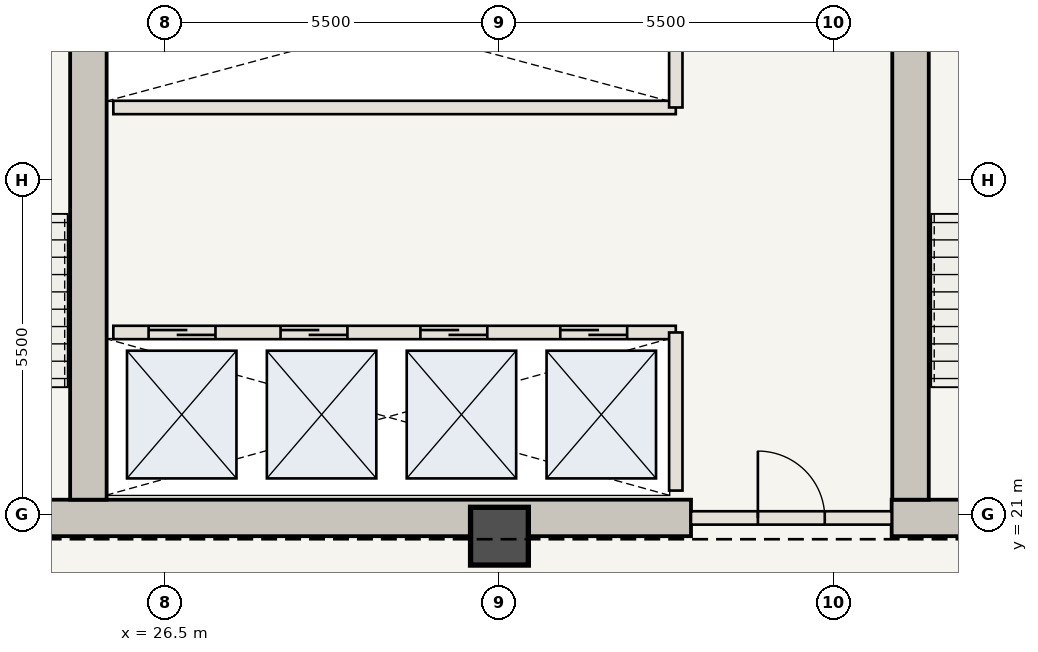
"""IFC4 building model, lengths in metres.
Left out: names, types, materials, properties, quantities, classifications, styles, units other than length and angle.
Written with IfcOpenShell. Run it as: python <this file> out.ifc"""

import sys

from ifc_helpers import new_model, si_unit, direction, frame, frame_2d, origin, origin_2d, place, context, subcontext, project, spatial, rectangle, extrude, element, fill, save


model = new_model("IFC4")
c1 = context("Model", 3, precision=1e-05, world=origin(), true_north=direction((0.0, 1.0)))
c2 = subcontext(c1, "Body", "Model", "MODEL_VIEW")
j1 = project(units=[si_unit("LENGTHUNIT", "METRE"), si_unit("PLANEANGLEUNIT", "RADIAN")], contexts=[c1])
p1 = place(None, origin())
s1 = spatial("IfcSite", under=j1, at=p1, CompositionType="ELEMENT")
p2 = place(p1, origin())
s2 = spatial("IfcBuilding", under=s1, at=p2, CompositionType="ELEMENT")
p3 = place(p2, frame((0.0, 0.0, 156.8)))
s3 = spatial("IfcBuildingStorey", under=s2, at=p3, CompositionType="ELEMENT", Elevation=156.8)
p4 = place(p3, frame((21.41, 20.95, 0.0), z_axis=(0.0, 0.0, 1.0), x_axis=(1.0, 0.0, 0.0)))
e1 = element("IfcWall", 1, at=p4, inside=s3, PredefinedType="SHEAR", context=c2, shape_type="SweptSolid", body=[
    extrude(rectangle(XDim=13.74, YDim=0.6, at=frame_2d((6.87, 0.0))), origin(), (0.0, 0.0, 1.0), 3.85),
])
p5 = place(p3, frame((38.45, 20.95, 0.0), z_axis=(0.0, 0.0, 1.0), x_axis=(1.0, 0.0, 0.0)))
e2 = element("IfcWall", 2, at=p5, inside=s3, PredefinedType="SHEAR", context=c2, shape_type="SweptSolid", body=[
    extrude(rectangle(XDim=4.14, YDim=0.6, at=frame_2d((2.07, 0.0))), origin(), (0.0, 0.0, 1.0), 3.85),
])
for number, where, z_axis, x_axis in (
    (3, (25.24, 21.25, 0.0), (0.0, 0.0, 1.0), (0.0, 1.0, 0.0)),
    (4, (38.76, 21.25, 0.0), (0.0, 0.0, 1.0), (0.0, 1.0, 0.0)),
):
    element("IfcWall", number, at=place(p3, frame(where, z_axis=z_axis, x_axis=x_axis)), inside=s3, PredefinedType="SHEAR", context=c2, shape_type="SweptSolid", body=[
        extrude(rectangle(XDim=9.35, YDim=0.6, at=frame_2d((4.675, 0.0))), origin(), (0.0, 0.0, 1.0), 3.85),
    ])
p6 = place(p3, frame((32.0, 20.65, 0.0), z_axis=(0.0, 0.0, 1.0), x_axis=(1.0, 0.0, 0.0)))
e5 = element("IfcColumn", 5, at=p6, inside=s3, PredefinedType="COLUMN", context=c2, shape_type="SweptSolid", body=[
    extrude(rectangle(XDim=0.95, YDim=0.95, at=origin_2d()), origin(), (0.0, 0.0, 1.0), 3.85),
])
p7 = place(p3, frame((35.15, 20.95, 0.0), z_axis=(0.0, 0.0, 1.0), x_axis=(1.0, 0.0, 0.0)))
e6 = element("IfcWall", 6, at=p7, inside=s3, PredefinedType="STANDARD", context=c2, shape_type="SweptSolid", body=[
    extrude(rectangle(XDim=3.3, YDim=0.22, at=frame_2d((1.65, 0.0))), origin(), (0.0, 0.0, 1.0), 3.685),
])
p8 = place(p7, frame((1.1, 0.0, 0.0)))
e7 = element("IfcOpeningElement", 7, at=p8, cuts=e6, PredefinedType="OPENING", context=c2, shape_type="SweptSolid", body=[
    extrude(rectangle(XDim=1.1, YDim=2.15, at=frame_2d((0.55, 1.075))), frame((0.0, 0.12, 0.0), z_axis=(0.0, -1.0, 0.0), x_axis=(1.0, 0.0, 0.0)), (0.0, 0.0, 1.0), 0.24),
])
p9 = place(p3, frame((25.65, 24.0, 0.0), z_axis=(0.0, 0.0, 1.0), x_axis=(1.0, 0.0, 0.0)))
e8 = element("IfcWall", 8, at=p9, inside=s3, PredefinedType="STANDARD", context=c2, shape_type="SweptSolid", body=[
    extrude(rectangle(XDim=9.25, YDim=0.22, at=frame_2d((4.625, 0.0))), origin(), (0.0, 0.0, 1.0), 3.685),
])
p10 = place(p9, frame((0.58, 0.0, 0.0)))
e9 = element("IfcOpeningElement", 9, at=p10, cuts=e8, PredefinedType="OPENING", context=c2, shape_type="SweptSolid", body=[
    extrude(rectangle(XDim=1.1, YDim=2.15, at=frame_2d((0.55, 1.075))), frame((0.0, 0.12, 0.0), z_axis=(0.0, -1.0, 0.0), x_axis=(1.0, 0.0, 0.0)), (0.0, 0.0, 1.0), 0.24),
])
p11 = place(p9, frame((2.75, 0.0, 0.0)))
e10 = element("IfcOpeningElement", 10, at=p11, cuts=e8, PredefinedType="OPENING", context=c2, shape_type="SweptSolid", body=[
    extrude(rectangle(XDim=1.1, YDim=2.15, at=frame_2d((0.55, 1.075))), frame((0.0, 0.12, 0.0), z_axis=(0.0, -1.0, 0.0), x_axis=(1.0, 0.0, 0.0)), (0.0, 0.0, 1.0), 0.24),
])
p12 = place(p9, frame((5.05, 0.0, 0.0)))
e11 = element("IfcOpeningElement", 11, at=p12, cuts=e8, PredefinedType="OPENING", context=c2, shape_type="SweptSolid", body=[
    extrude(rectangle(XDim=1.1, YDim=2.15, at=frame_2d((0.55, 1.075))), frame((0.0, 0.12, 0.0), z_axis=(0.0, -1.0, 0.0), x_axis=(1.0, 0.0, 0.0)), (0.0, 0.0, 1.0), 0.24),
])
p13 = place(p9, frame((7.35, 0.0, 0.0)))
e12 = element("IfcOpeningElement", 12, at=p13, cuts=e8, PredefinedType="OPENING", context=c2, shape_type="SweptSolid", body=[
    extrude(rectangle(XDim=1.1, YDim=2.15, at=frame_2d((0.55, 1.075))), frame((0.0, 0.12, 0.0), z_axis=(0.0, -1.0, 0.0), x_axis=(1.0, 0.0, 0.0)), (0.0, 0.0, 1.0), 0.24),
])
p14 = place(p3, frame((34.9, 21.4, 0.0), z_axis=(0.0, 0.0, 1.0), x_axis=(0.0, 1.0, 0.0)))
e13 = element("IfcWall", 13, at=p14, inside=s3, PredefinedType="STANDARD", context=c2, shape_type="SweptSolid", body=[
    extrude(rectangle(XDim=2.6, YDim=0.22, at=frame_2d((1.3, 0.0))), origin(), (0.0, 0.0, 1.0), 3.685),
])
p15 = place(p3, frame((25.65, 27.7, 0.0), z_axis=(0.0, 0.0, 1.0), x_axis=(1.0, 0.0, 0.0)))
e14 = element("IfcWall", 14, at=p15, inside=s3, PredefinedType="STANDARD", context=c2, shape_type="SweptSolid", body=[
    extrude(rectangle(XDim=9.25, YDim=0.22, at=frame_2d((4.625, 0.0))), origin(), (0.0, 0.0, 1.0), 3.685),
])
p16 = place(p3, frame((34.9, 27.7, 0.0), z_axis=(0.0, 0.0, 1.0), x_axis=(0.0, 1.0, 0.0)))
e15 = element("IfcWall", 15, at=p16, inside=s3, PredefinedType="STANDARD", context=c2, shape_type="SweptSolid", body=[
    extrude(rectangle(XDim=2.7, YDim=0.22, at=frame_2d((1.35, 0.0))), origin(), (0.0, 0.0, 1.0), 3.685),
])
p17 = place(p8, origin())
e16 = element("IfcDoor", 16, at=p17, inside=s3, OperationType="SINGLE_SWING_LEFT", PredefinedType="DOOR", context=c2, shape_type="SweptSolid", body=[
    extrude(rectangle(XDim=1.1, YDim=2.15, at=frame_2d((0.55, 1.075))), frame((0.0, 0.025, 0.0), z_axis=(0.0, -1.0, 0.0), x_axis=(1.0, 0.0, 0.0)), (0.0, 0.0, 1.0), 0.05),
])
fill(e7, e16)
p18 = place(p10, origin())
e17 = element("IfcDoor", 17, at=p18, inside=s3, OperationType="DOUBLE_DOOR_SLIDING", PredefinedType="DOOR", context=c2, shape_type="SweptSolid", body=[
    extrude(rectangle(XDim=1.1, YDim=2.15, at=frame_2d((0.55, 1.075))), frame((0.0, 0.025, 0.0), z_axis=(0.0, -1.0, 0.0), x_axis=(1.0, 0.0, 0.0)), (0.0, 0.0, 1.0), 0.05),
])
fill(e9, e17)
p19 = place(p11, origin())
e18 = element("IfcDoor", 18, at=p19, inside=s3, OperationType="DOUBLE_DOOR_SLIDING", PredefinedType="DOOR", context=c2, shape_type="SweptSolid", body=[
    extrude(rectangle(XDim=1.1, YDim=2.15, at=frame_2d((0.55, 1.075))), frame((0.0, 0.025, 0.0), z_axis=(0.0, -1.0, 0.0), x_axis=(1.0, 0.0, 0.0)), (0.0, 0.0, 1.0), 0.05),
])
fill(e10, e18)
p20 = place(p12, origin())
e19 = element("IfcDoor", 19, at=p20, inside=s3, OperationType="DOUBLE_DOOR_SLIDING", PredefinedType="DOOR", context=c2, shape_type="SweptSolid", body=[
    extrude(rectangle(XDim=1.1, YDim=2.15, at=frame_2d((0.55, 1.075))), frame((0.0, 0.025, 0.0), z_axis=(0.0, -1.0, 0.0), x_axis=(1.0, 0.0, 0.0)), (0.0, 0.0, 1.0), 0.05),
])
fill(e11, e19)
p21 = place(p13, origin())
e20 = element("IfcDoor", 20, at=p21, inside=s3, OperationType="DOUBLE_DOOR_SLIDING", PredefinedType="DOOR", context=c2, shape_type="SweptSolid", body=[
    extrude(rectangle(XDim=1.1, YDim=2.15, at=frame_2d((0.55, 1.075))), frame((0.0, 0.025, 0.0), z_axis=(0.0, -1.0, 0.0), x_axis=(1.0, 0.0, 0.0)), (0.0, 0.0, 1.0), 0.05),
])
fill(e12, e20)
save(model, sys.argv[1])
